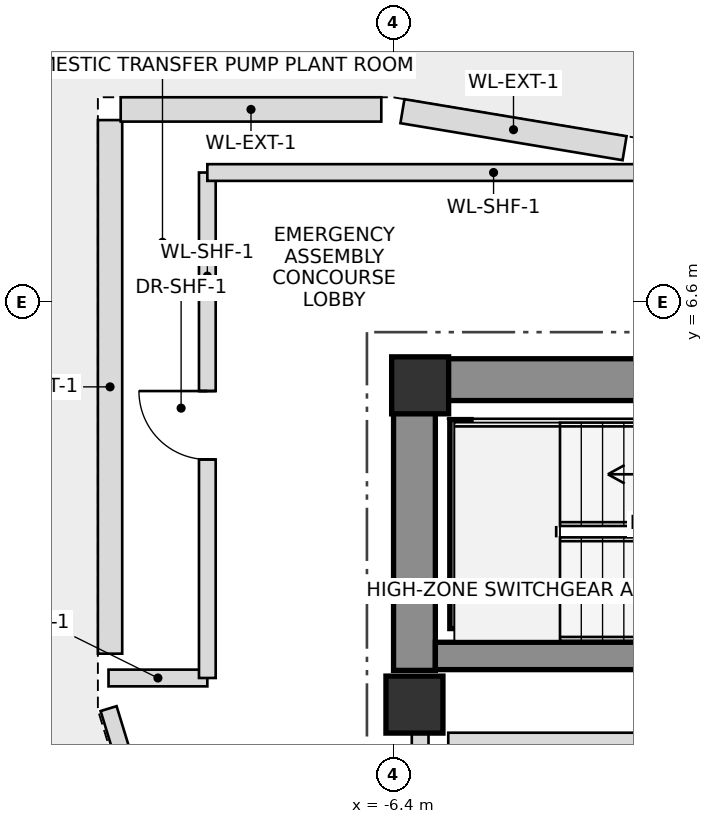
"""IFC4 building model, lengths in metres.
Left out: names, types, materials, properties, quantities, classifications, styles, units other than length and angle.
Written with IfcOpenShell. Run it as: python <this file> out.ifc"""

import sys

from ifc_helpers import new_model, si_unit, direction, frame, frame_2d, origin, origin_2d, place, context, subcontext, project, spatial, rectangle, extrude, source, transform, mapped, element, fill, save


model = new_model("IFC4")
c1 = context("Model", 3, precision=1e-05, world=origin(), true_north=direction((0.0, 1.0)))
c2 = subcontext(c1, "Body", "Model", "MODEL_VIEW")
j1 = project(units=[si_unit("LENGTHUNIT", "METRE"), si_unit("PLANEANGLEUNIT", "RADIAN")], contexts=[c1])
p1 = place(None, origin())
s1 = spatial("IfcSite", under=j1, at=p1, CompositionType="ELEMENT")
p2 = place(p1, origin())
s2 = spatial("IfcBuilding", under=s1, at=p2, CompositionType="ELEMENT")
p3 = place(p2, frame((0.0, 0.0, 252.45)))
s3 = spatial("IfcBuildingStorey", under=s2, at=p3, CompositionType="ELEMENT", Elevation=252.45)
m1 = source(origin(), c2, "Body", "SweptSolid", [
    extrude(rectangle(XDim=0.75, YDim=0.75, at=origin_2d()), origin(), (0.0, 0.0, 1.0), 5.1),
])
p4 = place(p3, frame((-6.05, 5.5, 0.0), z_axis=(0.0, 0.0, 1.0), x_axis=(1.0, 0.0, 0.0)))
e1 = element("IfcColumn", 1, at=p4, inside=s3, PredefinedType="COLUMN", context=c2, shape_type="MappedRepresentation", body=[
    mapped(m1, transform((0.0, 0.0, 0.0), scale=1.0)),
])
p5 = place(p3, frame((-6.4, 5.575, 0.0), z_axis=(0.0, 0.0, 1.0), x_axis=(1.0, 0.0, 0.0)))
e2 = element("IfcWall", 2, at=p5, inside=s3, PredefinedType="SHEAR", context=c2, shape_type="SweptSolid", body=[
    extrude(rectangle(XDim=12.8, YDim=0.55, at=frame_2d((6.4, 0.0))), origin(), (0.0, 0.0, 1.0), 5.1),
])
p6 = place(p5, frame((8.6, 0.0, 0.0)))
e3 = element("IfcOpeningElement", 3, at=p6, cuts=e2, PredefinedType="OPENING", context=c2, shape_type="SweptSolid", body=[
    extrude(rectangle(XDim=1.2, YDim=2.2, at=frame_2d((0.6, 1.1))), frame((0.0, 0.285, 0.0), z_axis=(0.0, -1.0, 0.0), x_axis=(1.0, 0.0, 0.0)), (0.0, 0.0, 1.0), 0.57),
])
p7 = place(p3, frame((-6.125, 1.75, 0.0), z_axis=(0.0, 0.0, 1.0), x_axis=(0.0, 1.0, 0.0)))
e4 = element("IfcWall", 4, at=p7, inside=s3, PredefinedType="SHEAR", context=c2, shape_type="SweptSolid", body=[
    extrude(rectangle(XDim=3.55, YDim=0.55, at=frame_2d((1.775, 0.0))), origin(), (0.0, 0.0, 1.0), 5.1),
])
p8 = place(p3, frame((-5.85, 1.94, 0.0), z_axis=(0.0, 0.0, 1.0), x_axis=(1.0, 0.0, 0.0)))
e5 = element("IfcWall", 5, at=p8, inside=s3, PredefinedType="SHEAR", context=c2, shape_type="SweptSolid", body=[
    extrude(rectangle(XDim=11.7, YDim=0.36, at=frame_2d((5.85, 0.0))), origin(), (0.0, 0.0, 1.0), 5.1),
])
p9 = place(p3, frame((-5.52, 2.3, 0.0), z_axis=(0.0, 0.0, 1.0), x_axis=(0.0, 1.0, 0.0)))
e6 = element("IfcWall", 6, at=p9, inside=s3, PredefinedType="SHEAR", context=c2, shape_type="SweptSolid", body=[
    extrude(rectangle(XDim=2.75, YDim=0.28, at=frame_2d((1.375, 0.0))), origin(), (0.0, 0.0, 1.0), 5.1),
])
p10 = place(p3, frame((-6.125, 1.3, 0.0), z_axis=(0.0, 0.0, 1.0), x_axis=(1.0, 0.0, 0.0)))
e7 = element("IfcColumn", 7, at=p10, inside=s3, PredefinedType="COLUMN", context=c2, shape_type="MappedRepresentation", body=[
    mapped(m1, transform((0.0, 0.0, 0.0), scale=1.0)),
])
p11 = place(p3, frame((-6.05, -0.95, 0.0), z_axis=(0.0, 0.0, 1.0), x_axis=(0.0, 1.0, 0.0)))
e8 = element("IfcWall", 8, at=p11, inside=s3, PredefinedType="PLUMBINGWALL", context=c2, shape_type="SweptSolid", body=[
    extrude(rectangle(XDim=1.9, YDim=0.22, at=frame_2d((0.95, 0.0))), origin(), (0.0, 0.0, 1.0), 3.88),
])
p12 = place(p11, frame((0.35, 0.0, 0.0)))
e9 = element("IfcOpeningElement", 9, at=p12, cuts=e8, PredefinedType="OPENING", context=c2, shape_type="SweptSolid", body=[
    extrude(rectangle(XDim=1.2, YDim=2.2, at=frame_2d((0.6, 1.1))), frame((0.0, 0.12, 0.0), z_axis=(0.0, -1.0, 0.0), x_axis=(1.0, 0.0, 0.0)), (0.0, 0.0, 1.0), 0.24),
])
p13 = place(p3, frame((-5.68, 0.84, 0.0), z_axis=(0.0, 0.0, 1.0), x_axis=(1.0, 0.0, 0.0)))
e10 = element("IfcWall", 10, at=p13, inside=s3, PredefinedType="PLUMBINGWALL", context=c2, shape_type="SweptSolid", body=[
    extrude(rectangle(XDim=11.33, YDim=0.18, at=frame_2d((5.665, 0.0))), origin(), (0.0, 0.0, 1.0), 4.9),
])
p14 = place(p13, frame((3.13, 0.0, 0.0)))
e11 = element("IfcOpeningElement", 11, at=p14, cuts=e10, PredefinedType="OPENING", context=c2, shape_type="SweptSolid", body=[
    extrude(rectangle(XDim=0.9, YDim=2.05, at=frame_2d((0.45, 1.025))), frame((0.0, 0.1, 0.0), z_axis=(0.0, -1.0, 0.0), x_axis=(1.0, 0.0, 0.0)), (0.0, 0.0, 1.0), 0.2),
])
p15 = place(p13, frame((10.25, 0.0, 0.0)))
e12 = element("IfcOpeningElement", 12, at=p15, cuts=e10, PredefinedType="OPENING", context=c2, shape_type="SweptSolid", body=[
    extrude(rectangle(XDim=0.9, YDim=2.05, at=frame_2d((0.45, 1.025))), frame((0.0, 0.1, 0.0), z_axis=(0.0, -1.0, 0.0), x_axis=(1.0, 0.0, 0.0)), (0.0, 0.0, 1.0), 0.2),
])
p16 = place(p3, frame((-10.13, 1.97, 0.0), z_axis=(0.0, 0.0, 1.0), x_axis=(0.0, 1.0, 0.0)))
e13 = element("IfcWall", 13, at=p16, inside=s3, PredefinedType="SOLIDWALL", context=c2, shape_type="SweptSolid", body=[
    extrude(rectangle(XDim=7.02, YDim=0.32, at=frame_2d((3.51, 0.0))), origin(), (0.0, 0.0, 1.0), 4.9),
])
p17 = place(p3, frame((-9.99, 9.13, 0.0), z_axis=(0.0, 0.0, 1.0), x_axis=(1.0, 0.0, 0.0)))
e14 = element("IfcWall", 14, at=p17, inside=s3, PredefinedType="SOLIDWALL", context=c2, shape_type="SweptSolid", body=[
    extrude(rectangle(XDim=3.429, YDim=0.32, at=frame_2d((1.714, 0.0))), origin(), (0.0, 0.0, 1.0), 4.9),
])
p18 = place(p3, frame((-6.283, 9.107, 0.0), z_axis=(0.0, 0.0, 1.0), x_axis=(0.986411732793, -0.164292097827, 0.0)))
e15 = element("IfcWall", 15, at=p18, inside=s3, PredefinedType="SOLIDWALL", context=c2, shape_type="SweptSolid", body=[
    extrude(rectangle(XDim=2.963, YDim=0.32, at=frame_2d((1.481, 0.0))), origin(), (0.0, 0.0, 1.0), 3.555),
])
p19 = place(p3, frame((-9.263, -1.65, 0.0), z_axis=(0.0, 0.0, 1.0), x_axis=(-0.292437587716, 0.956284611029, 0.0)))
e16 = element("IfcWall", 16, at=p19, inside=s3, PredefinedType="PLUMBINGWALL", context=c2, shape_type="SweptSolid", body=[
    extrude(rectangle(XDim=3.03, YDim=0.22, at=frame_2d((1.515, 0.0))), origin(), (0.0, 0.0, 1.0), 4.9),
])
p20 = place(p19, frame((1.108, 0.0, 0.0)))
e17 = element("IfcOpeningElement", 17, at=p20, cuts=e16, PredefinedType="OPENING", context=c2, shape_type="SweptSolid", body=[
    extrude(rectangle(XDim=1.2, YDim=2.2, at=frame_2d((0.6, 1.1))), frame((0.0, 0.12, 0.0), z_axis=(0.0, -1.0, 0.0), x_axis=(1.0, 0.0, 0.0)), (0.0, 0.0, 1.0), 0.24),
])
p21 = place(p3, frame((-10.15, 1.65, 0.0), z_axis=(0.0, 0.0, 1.0), x_axis=(1.0, 0.0, 0.0)))
e18 = element("IfcWall", 18, at=p21, inside=s3, PredefinedType="PLUMBINGWALL", context=c2, shape_type="SweptSolid", body=[
    extrude(rectangle(XDim=1.3, YDim=0.22, at=frame_2d((0.65, 0.0))), origin(), (0.0, 0.0, 1.0), 4.9),
])
p22 = place(p3, frame((-8.85, 1.65, 0.0), z_axis=(0.0, 0.0, 1.0), x_axis=(0.0, 1.0, 0.0)))
e19 = element("IfcWall", 19, at=p22, inside=s3, PredefinedType="PLUMBINGWALL", context=c2, shape_type="SweptSolid", body=[
    extrude(rectangle(XDim=6.65, YDim=0.22, at=frame_2d((3.325, 0.0))), origin(), (0.0, 0.0, 1.0), 4.9),
])
p23 = place(p22, frame((2.875, 0.0, 0.0)))
e20 = element("IfcOpeningElement", 20, at=p23, cuts=e19, PredefinedType="OPENING", context=c2, shape_type="SweptSolid", body=[
    extrude(rectangle(XDim=0.9, YDim=2.05, at=frame_2d((0.45, 1.025))), frame((0.0, 0.12, 0.0), z_axis=(0.0, -1.0, 0.0), x_axis=(1.0, 0.0, 0.0)), (0.0, 0.0, 1.0), 0.24),
])
p24 = place(p3, frame((-8.85, 8.3, 0.0), z_axis=(0.0, 0.0, 1.0), x_axis=(1.0, 0.0, 0.0)))
e21 = element("IfcWall", 21, at=p24, inside=s3, PredefinedType="PLUMBINGWALL", context=c2, shape_type="SweptSolid", body=[
    extrude(rectangle(XDim=7.532, YDim=0.22, at=frame_2d((3.766, 0.0))), origin(), (0.0, 0.0, 1.0), 3.555),
])
p25 = place(p23, origin())
e22 = element("IfcDoor", 22, at=p25, inside=s3, OperationType="SINGLE_SWING_RIGHT", PredefinedType="DOOR", context=c2, shape_type="SweptSolid", body=[
    extrude(rectangle(XDim=0.9, YDim=2.05, at=frame_2d((0.45, 1.025))), frame((0.0, 0.025, 0.0), z_axis=(0.0, -1.0, 0.0), x_axis=(1.0, 0.0, 0.0)), (0.0, 0.0, 1.0), 0.05),
])
fill(e20, e22)
save(model, sys.argv[1])
